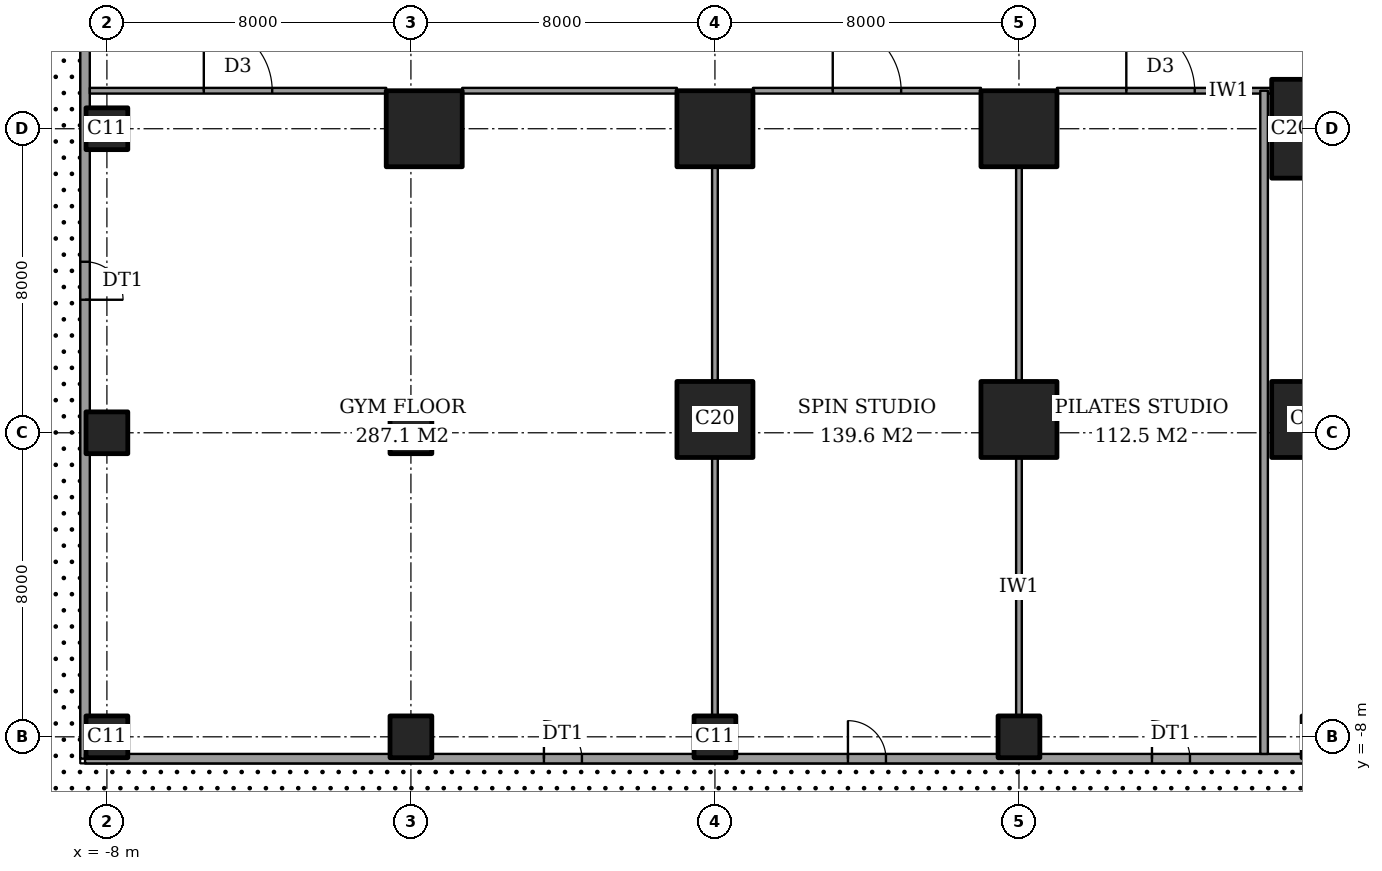
"""IFC4 building model, lengths in metres.
Left out: names, types, materials, properties, quantities, classifications, styles, units other than length and angle.
Written with IfcOpenShell. Run it as: python <this file> out.ifc"""

import sys

from ifc_helpers import new_model, si_unit, direction, frame, frame_2d, origin, origin_2d, place, context, subcontext, project, spatial, rectangle, extrude, element, fill, save


model = new_model("IFC4")
c1 = context("Model", 3, precision=1e-05, world=origin(), true_north=direction((0.0, 1.0)))
c2 = subcontext(c1, "Body", "Model", "MODEL_VIEW")
j1 = project(units=[si_unit("LENGTHUNIT", "METRE"), si_unit("PLANEANGLEUNIT", "RADIAN")], contexts=[c1])
p1 = place(None, origin())
s1 = spatial("IfcSite", under=j1, at=p1, CompositionType="ELEMENT")
p2 = place(p1, origin())
s2 = spatial("IfcBuilding", under=s1, at=p2, CompositionType="ELEMENT")
p3 = place(p2, frame((0.0, 0.0, 11.0)))
s3 = spatial("IfcBuildingStorey", under=s2, at=p3, CompositionType="ELEMENT", Elevation=11.0)
for number, where, z_axis, x_axis in (
    (1, (-8.0, -8.0, 0.0), (0.0, 0.0, 1.0), (1.0, 0.0, 0.0)),
    (2, (-8.0, 0.0, 0.0), (0.0, 0.0, 1.0), (1.0, 0.0, 0.0)),
    (3, (-8.0, 8.0, 0.0), (0.0, 0.0, 1.0), (1.0, 0.0, 0.0)),
    (4, (0.0, -8.0, 0.0), (0.0, 0.0, 1.0), (1.0, 0.0, 0.0)),
    (5, (0.0, 0.0, 0.0), (0.0, 0.0, 1.0), (1.0, 0.0, 0.0)),
):
    element("IfcColumn", number, at=place(p3, frame(where, z_axis=z_axis, x_axis=x_axis)), inside=s3, PredefinedType="COLUMN", context=c2, shape_type="SweptSolid", body=[
        extrude(rectangle(XDim=1.1, YDim=1.1, at=origin_2d()), origin(), (0.0, 0.0, 1.0), 5.0),
    ])
p4 = place(p3, frame((0.35, 8.0, 0.0), z_axis=(0.0, 0.0, 1.0), x_axis=(1.0, 0.0, 0.0)))
e6 = element("IfcColumn", 6, at=p4, inside=s3, PredefinedType="COLUMN", context=c2, shape_type="SweptSolid", body=[
    extrude(rectangle(XDim=2.0, YDim=2.0, at=origin_2d()), origin(), (0.0, 0.0, 1.0), 5.0),
])
p5 = place(p3, frame((8.0, -8.0, 0.0), z_axis=(0.0, 0.0, 1.0), x_axis=(1.0, 0.0, 0.0)))
e7 = element("IfcColumn", 7, at=p5, inside=s3, PredefinedType="COLUMN", context=c2, shape_type="SweptSolid", body=[
    extrude(rectangle(XDim=1.1, YDim=1.1, at=origin_2d()), origin(), (0.0, 0.0, 1.0), 5.0),
])
for number, where, z_axis, x_axis in (
    (8, (8.0, 0.35, 0.0), (0.0, 0.0, 1.0), (1.0, 0.0, 0.0)),
    (9, (8.0, 8.0, 0.0), (0.0, 0.0, 1.0), (1.0, 0.0, 0.0)),
):
    element("IfcColumn", number, at=place(p3, frame(where, z_axis=z_axis, x_axis=x_axis)), inside=s3, PredefinedType="COLUMN", context=c2, shape_type="SweptSolid", body=[
        extrude(rectangle(XDim=2.0, YDim=2.0, at=origin_2d()), origin(), (0.0, 0.0, 1.0), 5.0),
    ])
p6 = place(p3, frame((16.0, -8.0, 0.0), z_axis=(0.0, 0.0, 1.0), x_axis=(1.0, 0.0, 0.0)))
e10 = element("IfcColumn", 10, at=p6, inside=s3, PredefinedType="COLUMN", context=c2, shape_type="SweptSolid", body=[
    extrude(rectangle(XDim=1.1, YDim=1.1, at=origin_2d()), origin(), (0.0, 0.0, 1.0), 5.0),
])
for number, where, z_axis, x_axis in (
    (11, (16.0, 0.35, 0.0), (0.0, 0.0, 1.0), (1.0, 0.0, 0.0)),
    (12, (16.0, 8.0, 0.0), (0.0, 0.0, 1.0), (1.0, 0.0, 0.0)),
    (13, (23.65, 0.35, 0.0), (0.0, 0.0, 1.0), (1.0, 0.0, 0.0)),
):
    element("IfcColumn", number, at=place(p3, frame(where, z_axis=z_axis, x_axis=x_axis)), inside=s3, PredefinedType="COLUMN", context=c2, shape_type="SweptSolid", body=[
        extrude(rectangle(XDim=2.0, YDim=2.0, at=origin_2d()), origin(), (0.0, 0.0, 1.0), 5.0),
    ])
p7 = place(p3, frame((23.65, 8.0, 0.0), z_axis=(0.0, 0.0, 1.0), x_axis=(1.0, 0.0, 0.0)))
e14 = element("IfcColumn", 14, at=p7, inside=s3, PredefinedType="COLUMN", context=c2, shape_type="SweptSolid", body=[
    extrude(rectangle(XDim=2.0, YDim=2.6, at=origin_2d()), origin(), (0.0, 0.0, 1.0), 5.0),
])
p8 = place(p3, frame((-8.575, 56.575, 0.0), z_axis=(0.0, 0.0, 1.0), x_axis=(0.0, -1.0, 0.0)))
e15 = element("IfcWall", 15, at=p8, inside=s3, PredefinedType="SOLIDWALL", context=c2, shape_type="SweptSolid", body=[
    extrude(rectangle(XDim=65.15, YDim=0.25, at=frame_2d((32.575, 0.0))), origin(), (0.0, 0.0, 1.0), 5.0),
])
p9 = place(p8, frame((4.075, 0.0, 0.0)))
e16 = element("IfcOpeningElement", 16, at=p9, cuts=e15, PredefinedType="OPENING", context=c2, shape_type="SweptSolid", body=[
    extrude(rectangle(XDim=1.0, YDim=2.4, at=frame_2d((0.5, 1.2))), frame((0.0, 0.135, 0.0), z_axis=(0.0, -1.0, 0.0), x_axis=(1.0, 0.0, 0.0)), (0.0, 0.0, 1.0), 0.27),
])
p10 = place(p8, frame((20.075, 0.0, 0.0)))
e17 = element("IfcOpeningElement", 17, at=p10, cuts=e15, PredefinedType="OPENING", context=c2, shape_type="SweptSolid", body=[
    extrude(rectangle(XDim=1.0, YDim=2.4, at=frame_2d((0.5, 1.2))), frame((0.0, 0.135, 0.0), z_axis=(0.0, -1.0, 0.0), x_axis=(1.0, 0.0, 0.0)), (0.0, 0.0, 1.0), 0.27),
])
p11 = place(p8, frame((52.075, 0.0, 0.0)))
e18 = element("IfcOpeningElement", 18, at=p11, cuts=e15, PredefinedType="OPENING", context=c2, shape_type="SweptSolid", body=[
    extrude(rectangle(XDim=1.0, YDim=2.4, at=frame_2d((0.5, 1.2))), frame((0.0, 0.135, 0.0), z_axis=(0.0, -1.0, 0.0), x_axis=(1.0, 0.0, 0.0)), (0.0, 0.0, 1.0), 0.27),
])
p12 = place(p3, frame((-8.575, -8.575, 0.0), z_axis=(0.0, 0.0, 1.0), x_axis=(1.0, 0.0, 0.0)))
e19 = element("IfcWall", 19, at=p12, inside=s3, PredefinedType="SOLIDWALL", context=c2, shape_type="SweptSolid", body=[
    extrude(rectangle(XDim=83.15, YDim=0.25, at=frame_2d((41.575, 0.0))), origin(), (0.0, 0.0, 1.0), 5.0),
])
p13 = place(p12, frame((12.075, 0.0, 0.0)))
e20 = element("IfcOpeningElement", 20, at=p13, cuts=e19, PredefinedType="OPENING", context=c2, shape_type="SweptSolid", body=[
    extrude(rectangle(XDim=1.0, YDim=2.4, at=frame_2d((0.5, 1.2))), frame((0.0, 0.135, 0.0), z_axis=(0.0, -1.0, 0.0), x_axis=(1.0, 0.0, 0.0)), (0.0, 0.0, 1.0), 0.27),
])
p14 = place(p12, frame((20.075, 0.0, 0.0)))
e21 = element("IfcOpeningElement", 21, at=p14, cuts=e19, PredefinedType="OPENING", context=c2, shape_type="SweptSolid", body=[
    extrude(rectangle(XDim=1.0, YDim=2.4, at=frame_2d((0.5, 1.2))), frame((0.0, 0.135, 0.0), z_axis=(0.0, -1.0, 0.0), x_axis=(1.0, 0.0, 0.0)), (0.0, 0.0, 1.0), 0.27),
])
p15 = place(p12, frame((28.075, 0.0, 0.0)))
e22 = element("IfcOpeningElement", 22, at=p15, cuts=e19, PredefinedType="OPENING", context=c2, shape_type="SweptSolid", body=[
    extrude(rectangle(XDim=1.0, YDim=2.4, at=frame_2d((0.5, 1.2))), frame((0.0, 0.135, 0.0), z_axis=(0.0, -1.0, 0.0), x_axis=(1.0, 0.0, 0.0)), (0.0, 0.0, 1.0), 0.27),
])
p16 = place(p12, frame((54.075, 0.0, 0.0)))
e23 = element("IfcOpeningElement", 23, at=p16, cuts=e19, PredefinedType="OPENING", context=c2, shape_type="SweptSolid", body=[
    extrude(rectangle(XDim=1.0, YDim=2.4, at=frame_2d((0.5, 1.2))), frame((0.0, 0.135, 0.0), z_axis=(0.0, -1.0, 0.0), x_axis=(1.0, 0.0, 0.0)), (0.0, 0.0, 1.0), 0.27),
])
p17 = place(p12, frame((70.075, 0.0, 0.0)))
e24 = element("IfcOpeningElement", 24, at=p17, cuts=e19, PredefinedType="OPENING", context=c2, shape_type="SweptSolid", body=[
    extrude(rectangle(XDim=1.0, YDim=2.4, at=frame_2d((0.5, 1.2))), frame((0.0, 0.135, 0.0), z_axis=(0.0, -1.0, 0.0), x_axis=(1.0, 0.0, 0.0)), (0.0, 0.0, 1.0), 0.27),
])
p18 = place(p12, frame((78.075, 0.0, 0.0)))
e25 = element("IfcOpeningElement", 25, at=p18, cuts=e19, PredefinedType="OPENING", context=c2, shape_type="SweptSolid", body=[
    extrude(rectangle(XDim=1.0, YDim=2.4, at=frame_2d((0.5, 1.2))), frame((0.0, 0.135, 0.0), z_axis=(0.0, -1.0, 0.0), x_axis=(1.0, 0.0, 0.0)), (0.0, 0.0, 1.0), 0.27),
])
p19 = place(p3, frame((-8.45, 9.0, 0.0), z_axis=(0.0, 0.0, 1.0), x_axis=(1.0, 0.0, 0.0)))
e26 = element("IfcWall", 26, at=p19, inside=s3, PredefinedType="PARTITIONING", context=c2, shape_type="SweptSolid", body=[
    extrude(rectangle(XDim=7.8, YDim=0.15, at=frame_2d((3.9, 0.0))), origin(), (0.0, 0.0, 1.0), 4.7),
])
p20 = place(p19, frame((3.0, 0.0, 0.0)))
e27 = element("IfcOpeningElement", 27, at=p20, cuts=e26, PredefinedType="OPENING", context=c2, shape_type="SweptSolid", body=[
    extrude(rectangle(XDim=1.8, YDim=2.1, at=frame_2d((0.9, 1.05))), frame((0.0, 0.085, 0.0), z_axis=(0.0, -1.0, 0.0), x_axis=(1.0, 0.0, 0.0)), (0.0, 0.0, 1.0), 0.17),
])
p21 = place(p3, frame((1.35, 9.0, 0.0), z_axis=(0.0, 0.0, 1.0), x_axis=(1.0, 0.0, 0.0)))
e28 = element("IfcWall", 28, at=p21, inside=s3, PredefinedType="PARTITIONING", context=c2, shape_type="SweptSolid", body=[
    extrude(rectangle(XDim=5.65, YDim=0.15, at=frame_2d((2.825, 0.0))), origin(), (0.0, 0.0, 1.0), 4.7),
])
p22 = place(p3, frame((9.0, 9.0, 0.0), z_axis=(0.0, 0.0, 1.0), x_axis=(1.0, 0.0, 0.0)))
e29 = element("IfcWall", 29, at=p22, inside=s3, PredefinedType="PARTITIONING", context=c2, shape_type="SweptSolid", body=[
    extrude(rectangle(XDim=6.0, YDim=0.15, at=frame_2d((3.0, 0.0))), origin(), (0.0, 0.0, 1.0), 4.7),
])
p23 = place(p22, frame((2.1, 0.0, 0.0)))
e30 = element("IfcOpeningElement", 30, at=p23, cuts=e29, PredefinedType="OPENING", context=c2, shape_type="SweptSolid", body=[
    extrude(rectangle(XDim=1.8, YDim=2.1, at=frame_2d((0.9, 1.05))), frame((0.0, 0.085, 0.0), z_axis=(0.0, -1.0, 0.0), x_axis=(1.0, 0.0, 0.0)), (0.0, 0.0, 1.0), 0.17),
])
p24 = place(p3, frame((17.0, 9.0, 0.0), z_axis=(0.0, 0.0, 1.0), x_axis=(1.0, 0.0, 0.0)))
e31 = element("IfcWall", 31, at=p24, inside=s3, PredefinedType="PARTITIONING", context=c2, shape_type="SweptSolid", body=[
    extrude(rectangle(XDim=5.65, YDim=0.15, at=frame_2d((2.825, 0.0))), origin(), (0.0, 0.0, 1.0), 4.7),
])
p25 = place(p24, frame((1.825, 0.0, 0.0)))
e32 = element("IfcOpeningElement", 32, at=p25, cuts=e31, PredefinedType="OPENING", context=c2, shape_type="SweptSolid", body=[
    extrude(rectangle(XDim=1.8, YDim=2.1, at=frame_2d((0.9, 1.05))), frame((0.0, 0.085, 0.0), z_axis=(0.0, -1.0, 0.0), x_axis=(1.0, 0.0, 0.0)), (0.0, 0.0, 1.0), 0.17),
])
p26 = place(p3, frame((8.0, -7.45, 0.0), z_axis=(0.0, 0.0, 1.0), x_axis=(0.0, 1.0, 0.0)))
e33 = element("IfcWall", 33, at=p26, inside=s3, PredefinedType="PARTITIONING", context=c2, shape_type="SweptSolid", body=[
    extrude(rectangle(XDim=6.8, YDim=0.15, at=frame_2d((3.4, 0.0))), origin(), (0.0, 0.0, 1.0), 3.3),
])
p27 = place(p3, frame((8.0, 1.35, 0.0), z_axis=(0.0, 0.0, 1.0), x_axis=(0.0, 1.0, 0.0)))
e34 = element("IfcWall", 34, at=p27, inside=s3, PredefinedType="PARTITIONING", context=c2, shape_type="SweptSolid", body=[
    extrude(rectangle(XDim=5.65, YDim=0.15, at=frame_2d((2.825, 0.0))), origin(), (0.0, 0.0, 1.0), 3.3),
])
p28 = place(p3, frame((16.0, -7.45, 0.0), z_axis=(0.0, 0.0, 1.0), x_axis=(0.0, 1.0, 0.0)))
e35 = element("IfcWall", 35, at=p28, inside=s3, PredefinedType="PARTITIONING", context=c2, shape_type="SweptSolid", body=[
    extrude(rectangle(XDim=6.8, YDim=0.15, at=frame_2d((3.4, 0.0))), origin(), (0.0, 0.0, 1.0), 3.3),
])
p29 = place(p3, frame((16.0, 1.35, 0.0), z_axis=(0.0, 0.0, 1.0), x_axis=(0.0, 1.0, 0.0)))
e36 = element("IfcWall", 36, at=p29, inside=s3, PredefinedType="PARTITIONING", context=c2, shape_type="SweptSolid", body=[
    extrude(rectangle(XDim=5.65, YDim=0.15, at=frame_2d((2.825, 0.0))), origin(), (0.0, 0.0, 1.0), 3.3),
])
p30 = place(p3, frame((22.45, -8.45, 0.0), z_axis=(0.0, 0.0, 1.0), x_axis=(0.0, 1.0, 0.0)))
e37 = element("IfcWall", 37, at=p30, inside=s3, PredefinedType="PARTITIONING", context=c2, shape_type="SweptSolid", body=[
    extrude(rectangle(XDim=17.45, YDim=0.2, at=frame_2d((8.725, 0.0))), origin(), (0.0, 0.0, 1.0), 4.7),
])
p31 = place(p11, origin())
e38 = element("IfcDoor", 38, at=p31, inside=s3, OperationType="SINGLE_SWING_LEFT", PredefinedType="DOOR", context=c2, shape_type="SweptSolid", body=[
    extrude(rectangle(XDim=1.0, YDim=2.4, at=frame_2d((0.5, 1.2))), frame((0.0, 0.025, 0.0), z_axis=(0.0, -1.0, 0.0), x_axis=(1.0, 0.0, 0.0)), (0.0, 0.0, 1.0), 0.05),
])
fill(e18, e38)
p32 = place(p13, origin())
e39 = element("IfcDoor", 39, at=p32, inside=s3, OperationType="SINGLE_SWING_RIGHT", PredefinedType="DOOR", context=c2, shape_type="SweptSolid", body=[
    extrude(rectangle(XDim=1.0, YDim=2.4, at=frame_2d((0.5, 1.2))), frame((0.0, 0.025, 0.0), z_axis=(0.0, -1.0, 0.0), x_axis=(1.0, 0.0, 0.0)), (0.0, 0.0, 1.0), 0.05),
])
fill(e20, e39)
p33 = place(p14, origin())
e40 = element("IfcDoor", 40, at=p33, inside=s3, OperationType="SINGLE_SWING_RIGHT", PredefinedType="DOOR", context=c2, shape_type="SweptSolid", body=[
    extrude(rectangle(XDim=1.0, YDim=2.4, at=frame_2d((0.5, 1.2))), frame((0.0, 0.025, 0.0), z_axis=(0.0, -1.0, 0.0), x_axis=(1.0, 0.0, 0.0)), (0.0, 0.0, 1.0), 0.05),
])
fill(e21, e40)
p34 = place(p15, origin())
e41 = element("IfcDoor", 41, at=p34, inside=s3, OperationType="SINGLE_SWING_RIGHT", PredefinedType="DOOR", context=c2, shape_type="SweptSolid", body=[
    extrude(rectangle(XDim=1.0, YDim=2.4, at=frame_2d((0.5, 1.2))), frame((0.0, 0.025, 0.0), z_axis=(0.0, -1.0, 0.0), x_axis=(1.0, 0.0, 0.0)), (0.0, 0.0, 1.0), 0.05),
])
fill(e22, e41)
p35 = place(p20, origin())
e42 = element("IfcDoor", 42, at=p35, inside=s3, OperationType="DOUBLE_DOOR_DOUBLE_SWING", PredefinedType="DOOR", context=c2, shape_type="SweptSolid", body=[
    extrude(rectangle(XDim=1.8, YDim=2.1, at=frame_2d((0.9, 1.05))), frame((0.0, 0.025, 0.0), z_axis=(0.0, -1.0, 0.0), x_axis=(1.0, 0.0, 0.0)), (0.0, 0.0, 1.0), 0.05),
])
fill(e27, e42)
p36 = place(p23, origin())
e43 = element("IfcDoor", 43, at=p36, inside=s3, OperationType="DOUBLE_DOOR_DOUBLE_SWING", PredefinedType="DOOR", context=c2, shape_type="SweptSolid", body=[
    extrude(rectangle(XDim=1.8, YDim=2.1, at=frame_2d((0.9, 1.05))), frame((0.0, 0.025, 0.0), z_axis=(0.0, -1.0, 0.0), x_axis=(1.0, 0.0, 0.0)), (0.0, 0.0, 1.0), 0.05),
])
fill(e30, e43)
p37 = place(p25, origin())
e44 = element("IfcDoor", 44, at=p37, inside=s3, OperationType="DOUBLE_DOOR_DOUBLE_SWING", PredefinedType="DOOR", context=c2, shape_type="SweptSolid", body=[
    extrude(rectangle(XDim=1.8, YDim=2.1, at=frame_2d((0.9, 1.05))), frame((0.0, 0.025, 0.0), z_axis=(0.0, -1.0, 0.0), x_axis=(1.0, 0.0, 0.0)), (0.0, 0.0, 1.0), 0.05),
])
fill(e32, e44)
save(model, sys.argv[1])
